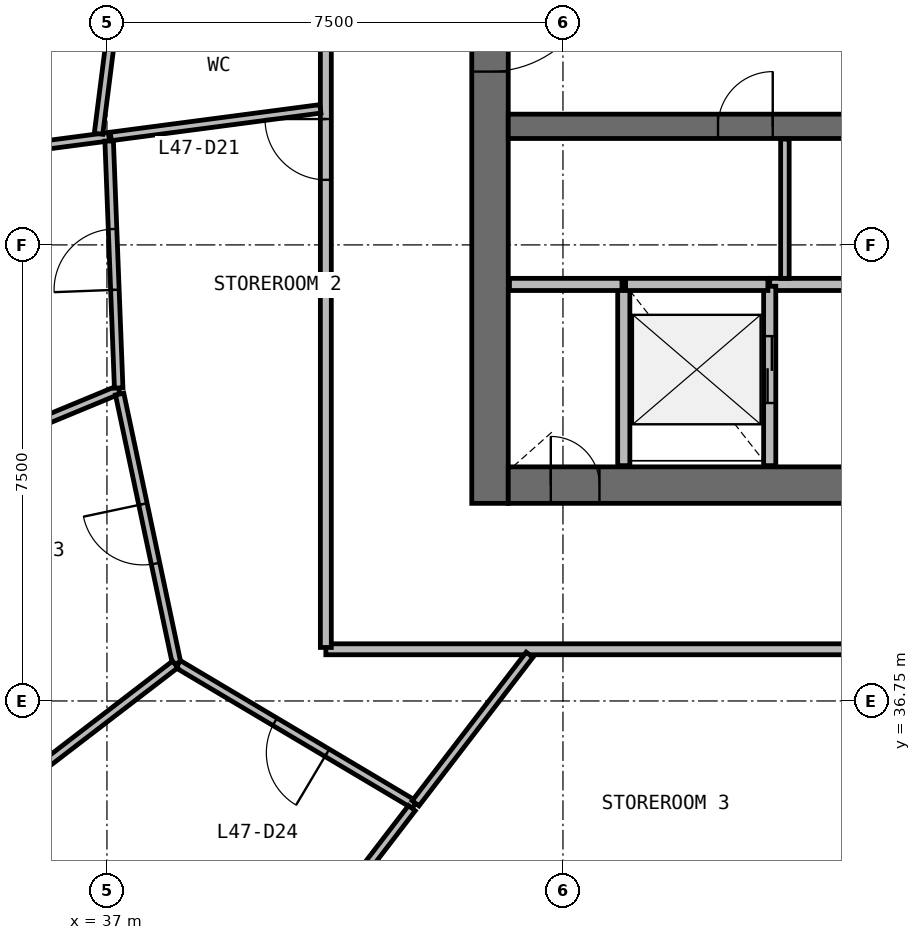
"""IFC4 building model, lengths in metres.
Left out: names, types, materials, properties, quantities, classifications, styles, units other than length and angle.
Written with IfcOpenShell. Run it as: python <this file> out.ifc"""

import sys

from ifc_helpers import new_model, si_unit, direction, frame, frame_2d, origin, place, context, subcontext, project, spatial, rectangle, extrude, source, transform, mapped, element, fill, save


model = new_model("IFC4")
c1 = context("Model", 3, precision=1e-05, world=origin(), true_north=direction((0.0, 1.0)))
c2 = subcontext(c1, "Body", "Model", "MODEL_VIEW")
j1 = project(units=[si_unit("LENGTHUNIT", "METRE"), si_unit("PLANEANGLEUNIT", "RADIAN")], contexts=[c1])
p1 = place(None, origin())
s1 = spatial("IfcSite", under=j1, at=p1, CompositionType="ELEMENT")
p2 = place(p1, origin())
s2 = spatial("IfcBuilding", under=s1, at=p2, CompositionType="ELEMENT")
p3 = place(p2, frame((0.0, 0.0, 195.5)))
s3 = spatial("IfcBuildingStorey", under=s2, at=p3, CompositionType="ELEMENT", Elevation=195.5)
p4 = place(p3, frame((43.3, 56.0, 0.0), z_axis=(0.0, 0.0, 1.0), x_axis=(0.0, -1.0, 0.0)))
e1 = element("IfcWall", 1, at=p4, inside=s3, PredefinedType="SHEAR", context=c2, shape_type="SweptSolid", body=[
    extrude(rectangle(XDim=16.0, YDim=0.6, at=frame_2d((8.0, 0.0))), origin(), (0.0, 0.0, 1.0), 3.9),
])
p5 = place(p4, frame((7.1, 0.0, 0.0)))
e2 = element("IfcOpeningElement", 2, at=p5, cuts=e1, PredefinedType="OPENING", context=c2, shape_type="SweptSolid", body=[
    extrude(rectangle(XDim=1.8, YDim=2.1, at=frame_2d((0.9, 1.05))), frame((0.0, 0.31, 0.0), z_axis=(0.0, -1.0, 0.0), x_axis=(1.0, 0.0, 0.0)), (0.0, 0.0, 1.0), 0.62),
])
p6 = place(p3, frame((43.6, 40.3, 0.0), z_axis=(0.0, 0.0, 1.0), x_axis=(1.0, 0.0, 0.0)))
e3 = element("IfcWall", 3, at=p6, inside=s3, PredefinedType="SHEAR", context=c2, shape_type="SweptSolid", body=[
    extrude(rectangle(XDim=16.8, YDim=0.6, at=frame_2d((8.4, 0.0))), origin(), (0.0, 0.0, 1.0), 3.9),
])
p7 = place(p6, frame((10.3, 0.0, 0.0)))
e4 = element("IfcOpeningElement", 4, at=p7, cuts=e3, PredefinedType="OPENING", context=c2, shape_type="SweptSolid", body=[
    extrude(rectangle(XDim=1.2, YDim=2.1, at=frame_2d((0.6, 1.05))), frame((0.0, 0.31, 0.0), z_axis=(0.0, -1.0, 0.0), x_axis=(1.0, 0.0, 0.0)), (0.0, 0.0, 1.0), 0.62),
])
p8 = place(p6, frame((7.25, 0.0, 0.0)))
e5 = element("IfcOpeningElement", 5, at=p8, cuts=e3, PredefinedType="OPENING", context=c2, shape_type="SweptSolid", body=[
    extrude(rectangle(XDim=1.1, YDim=2.1, at=frame_2d((0.55, 1.05))), frame((0.0, 0.31, 0.0), z_axis=(0.0, -1.0, 0.0), x_axis=(1.0, 0.0, 0.0)), (0.0, 0.0, 1.0), 0.62),
])
p9 = place(p6, frame((0.7, 0.0, 0.0)))
e6 = element("IfcOpeningElement", 6, at=p9, cuts=e3, PredefinedType="OPENING", context=c2, shape_type="SweptSolid", body=[
    extrude(rectangle(XDim=0.8, YDim=2.1, at=frame_2d((0.4, 1.05))), frame((0.0, 0.31, 0.0), z_axis=(0.0, -1.0, 0.0), x_axis=(1.0, 0.0, 0.0)), (0.0, 0.0, 1.0), 0.62),
])
p10 = place(p3, frame((43.6, 46.2, 0.0), z_axis=(0.0, 0.0, 1.0), x_axis=(1.0, 0.0, 0.0)))
e7 = element("IfcWall", 7, at=p10, inside=s3, PredefinedType="SHEAR", context=c2, shape_type="SweptSolid", body=[
    extrude(rectangle(XDim=16.8, YDim=0.4, at=frame_2d((8.4, 0.0))), origin(), (0.0, 0.0, 1.0), 3.9),
])
p11 = place(p10, frame((9.8, 0.0, 0.0)))
e8 = element("IfcOpeningElement", 8, at=p11, cuts=e7, PredefinedType="OPENING", context=c2, shape_type="SweptSolid", body=[
    extrude(rectangle(XDim=1.1, YDim=2.1, at=frame_2d((0.55, 1.05))), frame((0.0, 0.21, 0.0), z_axis=(0.0, -1.0, 0.0), x_axis=(1.0, 0.0, 0.0)), (0.0, 0.0, 1.0), 0.42),
])
p12 = place(p10, frame((12.3, 0.0, 0.0)))
e9 = element("IfcOpeningElement", 9, at=p12, cuts=e7, PredefinedType="OPENING", context=c2, shape_type="SweptSolid", body=[
    extrude(rectangle(XDim=1.1, YDim=2.1, at=frame_2d((0.55, 1.05))), frame((0.0, 0.21, 0.0), z_axis=(0.0, -1.0, 0.0), x_axis=(1.0, 0.0, 0.0)), (0.0, 0.0, 1.0), 0.42),
])
p13 = place(p10, frame((14.8, 0.0, 0.0)))
e10 = element("IfcOpeningElement", 10, at=p13, cuts=e7, PredefinedType="OPENING", context=c2, shape_type="SweptSolid", body=[
    extrude(rectangle(XDim=1.1, YDim=2.1, at=frame_2d((0.55, 1.05))), frame((0.0, 0.21, 0.0), z_axis=(0.0, -1.0, 0.0), x_axis=(1.0, 0.0, 0.0)), (0.0, 0.0, 1.0), 0.42),
])
p14 = place(p10, frame((3.45, 0.0, 0.0)))
e11 = element("IfcOpeningElement", 11, at=p14, cuts=e7, PredefinedType="OPENING", context=c2, shape_type="SweptSolid", body=[
    extrude(rectangle(XDim=0.9, YDim=2.1, at=frame_2d((0.45, 1.05))), frame((0.0, 0.21, 0.0), z_axis=(0.0, -1.0, 0.0), x_axis=(1.0, 0.0, 0.0)), (0.0, 0.0, 1.0), 0.42),
])
p15 = place(p10, frame((7.85, 0.0, 0.0)))
e12 = element("IfcOpeningElement", 12, at=p15, cuts=e7, PredefinedType="OPENING", context=c2, shape_type="SweptSolid", body=[
    extrude(rectangle(XDim=0.9, YDim=2.1, at=frame_2d((0.45, 1.05))), frame((0.0, 0.21, 0.0), z_axis=(0.0, -1.0, 0.0), x_axis=(1.0, 0.0, 0.0)), (0.0, 0.0, 1.0), 0.42),
])
p16 = place(p3, frame((52.7, 43.6, 0.0), z_axis=(0.0, 0.0, 1.0), x_axis=(-1.0, 0.0, 0.0)))
e13 = element("IfcWall", 13, at=p16, inside=s3, PredefinedType="SOLIDWALL", context=c2, shape_type="SweptSolid", body=[
    extrude(rectangle(XDim=4.8, YDim=0.2, at=frame_2d((2.4, 0.0))), origin(), (0.0, 0.0, 1.0), 3.58),
])
p17 = place(p3, frame((45.5, 43.6, 0.0), z_axis=(0.0, 0.0, 1.0), x_axis=(0.0, -1.0, 0.0)))
e14 = element("IfcWall", 14, at=p17, inside=s3, PredefinedType="SOLIDWALL", context=c2, shape_type="SweptSolid", body=[
    extrude(rectangle(XDim=2.98, YDim=0.2, at=frame_2d((1.49, 0.0))), origin(), (0.0, 0.0, 1.0), 3.58),
])
p18 = place(p3, frame((47.9, 40.62, 0.0), z_axis=(0.0, 0.0, 1.0), x_axis=(0.0, 1.0, 0.0)))
e15 = element("IfcWall", 15, at=p18, inside=s3, PredefinedType="SOLIDWALL", context=c2, shape_type="SweptSolid", body=[
    extrude(rectangle(XDim=2.95, YDim=0.2, at=frame_2d((1.475, 0.0))), origin(), (0.0, 0.0, 1.0), 3.58),
])
p19 = place(p18, frame((1.03, 0.0, 0.0)))
e16 = element("IfcOpeningElement", 16, at=p19, cuts=e15, PredefinedType="OPENING", context=c2, shape_type="SweptSolid", body=[
    extrude(rectangle(XDim=1.1, YDim=2.1, at=frame_2d((0.55, 1.05))), frame((0.0, 0.11, 0.0), z_axis=(0.0, -1.0, 0.0), x_axis=(1.0, 0.0, 0.0)), (0.0, 0.0, 1.0), 0.22),
])
p20 = place(p3, frame((47.87, 43.6, 0.0), z_axis=(0.0, 0.0, 1.0), x_axis=(-1.0, 0.0, 0.0)))
e17 = element("IfcWall", 17, at=p20, inside=s3, PredefinedType="SOLIDWALL", context=c2, shape_type="SweptSolid", body=[
    extrude(rectangle(XDim=2.34, YDim=0.2, at=frame_2d((1.17, 0.0))), origin(), (0.0, 0.0, 1.0), 3.58),
])
p21 = place(p3, frame((45.47, 43.6, 0.0), z_axis=(0.0, 0.0, 1.0), x_axis=(-1.0, 0.0, 0.0)))
e18 = element("IfcWall", 18, at=p21, inside=s3, PredefinedType="SOLIDWALL", context=c2, shape_type="SweptSolid", body=[
    extrude(rectangle(XDim=1.85, YDim=0.2, at=frame_2d((0.925, 0.0))), origin(), (0.0, 0.0, 1.0), 3.58),
])
p22 = place(p3, frame((63.4, 37.6, 0.0), z_axis=(0.0, 0.0, 1.0), x_axis=(-1.0, 0.0, 0.0)))
e19 = element("IfcWall", 19, at=p22, inside=s3, PredefinedType="PARTITIONING", context=c2, shape_type="SweptSolid", body=[
    extrude(rectangle(XDim=22.8, YDim=0.18, at=frame_2d((11.4, 0.0))), origin(), (0.0, 0.0, 1.0), 2.88),
])
p23 = place(p22, frame((12.95, 0.0, 0.0)))
e20 = element("IfcOpeningElement", 20, at=p23, cuts=e19, PredefinedType="OPENING", context=c2, shape_type="SweptSolid", body=[
    extrude(rectangle(XDim=1.0, YDim=2.1, at=frame_2d((0.5, 1.05))), frame((0.0, 0.1, 0.0), z_axis=(0.0, -1.0, 0.0), x_axis=(1.0, 0.0, 0.0)), (0.0, 0.0, 1.0), 0.2),
])
p24 = place(p22, frame((10.95, 0.0, 0.0)))
e21 = element("IfcOpeningElement", 21, at=p24, cuts=e19, PredefinedType="OPENING", context=c2, shape_type="SweptSolid", body=[
    extrude(rectangle(XDim=1.0, YDim=2.1, at=frame_2d((0.5, 1.05))), frame((0.0, 0.1, 0.0), z_axis=(0.0, -1.0, 0.0), x_axis=(1.0, 0.0, 0.0)), (0.0, 0.0, 1.0), 0.2),
])
p25 = place(p22, frame((8.75, 0.0, 0.0)))
e22 = element("IfcOpeningElement", 22, at=p25, cuts=e19, PredefinedType="OPENING", context=c2, shape_type="SweptSolid", body=[
    extrude(rectangle(XDim=1.0, YDim=2.1, at=frame_2d((0.5, 1.05))), frame((0.0, 0.1, 0.0), z_axis=(0.0, -1.0, 0.0), x_axis=(1.0, 0.0, 0.0)), (0.0, 0.0, 1.0), 0.2),
])
p26 = place(p3, frame((40.6, 37.63, 0.0), z_axis=(0.0, 0.0, 1.0), x_axis=(0.0, 1.0, 0.0)))
e23 = element("IfcWall", 23, at=p26, inside=s3, PredefinedType="PARTITIONING", context=c2, shape_type="SweptSolid", body=[
    extrude(rectangle(XDim=20.74, YDim=0.18, at=frame_2d((10.37, 0.0))), origin(), (0.0, 0.0, 1.0), 2.88),
])
p27 = place(p26, frame((12.19, 0.0, 0.0)))
e24 = element("IfcOpeningElement", 24, at=p27, cuts=e23, PredefinedType="OPENING", context=c2, shape_type="SweptSolid", body=[
    extrude(rectangle(XDim=0.9, YDim=2.1, at=frame_2d((0.45, 1.05))), frame((0.0, 0.1, 0.0), z_axis=(0.0, -1.0, 0.0), x_axis=(1.0, 0.0, 0.0)), (0.0, 0.0, 1.0), 0.2),
])
p28 = place(p26, frame((9.99, 0.0, 0.0)))
e25 = element("IfcOpeningElement", 25, at=p28, cuts=e23, PredefinedType="OPENING", context=c2, shape_type="SweptSolid", body=[
    extrude(rectangle(XDim=0.9, YDim=2.1, at=frame_2d((0.45, 1.05))), frame((0.0, 0.1, 0.0), z_axis=(0.0, -1.0, 0.0), x_axis=(1.0, 0.0, 0.0)), (0.0, 0.0, 1.0), 0.2),
])
p29 = place(p26, frame((7.69, 0.0, 0.0)))
e26 = element("IfcOpeningElement", 26, at=p29, cuts=e23, PredefinedType="OPENING", context=c2, shape_type="SweptSolid", body=[
    extrude(rectangle(XDim=1.0, YDim=2.1, at=frame_2d((0.5, 1.05))), frame((0.0, 0.1, 0.0), z_axis=(0.0, -1.0, 0.0), x_axis=(1.0, 0.0, 0.0)), (0.0, 0.0, 1.0), 0.2),
])
p30 = place(p26, frame((15.49, 0.0, 0.0)))
e27 = element("IfcOpeningElement", 27, at=p30, cuts=e23, PredefinedType="OPENING", context=c2, shape_type="SweptSolid", body=[
    extrude(rectangle(XDim=1.0, YDim=2.1, at=frame_2d((0.5, 1.05))), frame((0.0, 0.1, 0.0), z_axis=(0.0, -1.0, 0.0), x_axis=(1.0, 0.0, 0.0)), (0.0, 0.0, 1.0), 0.2),
])
p31 = place(p3, frame((37.194, 41.867, 0.0), z_axis=(0.0, 0.0, 1.0), x_axis=(-0.923879050947, -0.382684594961, 0.0)))
e28 = element("IfcWall", 28, at=p31, inside=s3, PredefinedType="PARTITIONING", context=c2, shape_type="SweptSolid", body=[
    extrude(rectangle(XDim=5.982, YDim=0.14, at=frame_2d((2.991, 0.0))), origin(), (0.0, 0.0, 1.0), 2.88),
])
p32 = place(p3, frame((31.388, 45.286, 0.0), z_axis=(0.0, 0.0, 1.0), x_axis=(0.991445974971, 0.130517733331, 0.0)))
e29 = element("IfcWall", 29, at=p32, inside=s3, PredefinedType="PARTITIONING", context=c2, shape_type="SweptSolid", body=[
    extrude(rectangle(XDim=5.694, YDim=0.14, at=frame_2d((2.847, 0.0))), origin(), (0.0, 0.0, 1.0), 2.88),
])
p33 = place(p32, frame((2.25, 0.0, 0.0)))
e30 = element("IfcOpeningElement", 30, at=p33, cuts=e29, PredefinedType="OPENING", context=c2, shape_type="SweptSolid", body=[
    extrude(rectangle(XDim=1.0, YDim=2.1, at=frame_2d((0.5, 1.05))), frame((0.0, 0.08, 0.0), z_axis=(0.0, -1.0, 0.0), x_axis=(1.0, 0.0, 0.0)), (0.0, 0.0, 1.0), 0.16),
])
p34 = place(p3, frame((38.146, 37.369, 0.0), z_axis=(0.0, 0.0, 1.0), x_axis=(-0.207067802177, 0.978326594396, 0.0)))
e31 = element("IfcWall", 31, at=p34, inside=s3, PredefinedType="PARTITIONING", context=c2, shape_type="SweptSolid", body=[
    extrude(rectangle(XDim=4.526, YDim=0.14, at=frame_2d((2.263, 0.0))), origin(), (0.0, 0.0, 1.0), 2.88),
])
p35 = place(p34, frame((1.676, 0.0, 0.0)))
e32 = element("IfcOpeningElement", 32, at=p35, cuts=e31, PredefinedType="OPENING", context=c2, shape_type="SweptSolid", body=[
    extrude(rectangle(XDim=1.0, YDim=2.1, at=frame_2d((0.5, 1.05))), frame((0.0, 0.08, 0.0), z_axis=(0.0, -1.0, 0.0), x_axis=(1.0, 0.0, 0.0)), (0.0, 0.0, 1.0), 0.16),
])
p36 = place(p3, frame((42.058, 35.043, 0.0), z_axis=(0.0, 0.0, 1.0), x_axis=(-0.859530118144, 0.511085096635, 0.0)))
e33 = element("IfcWall", 33, at=p36, inside=s3, PredefinedType="PARTITIONING", context=c2, shape_type="SweptSolid", body=[
    extrude(rectangle(XDim=4.521, YDim=0.14, at=frame_2d((2.261, 0.0))), origin(), (0.0, 0.0, 1.0), 2.88),
])
p37 = place(p36, frame((1.671, 0.0, 0.0)))
e34 = element("IfcOpeningElement", 34, at=p37, cuts=e33, PredefinedType="OPENING", context=c2, shape_type="SweptSolid", body=[
    extrude(rectangle(XDim=1.0, YDim=2.1, at=frame_2d((0.5, 1.05))), frame((0.0, 0.08, 0.0), z_axis=(0.0, -1.0, 0.0), x_axis=(1.0, 0.0, 0.0)), (0.0, 0.0, 1.0), 0.16),
])
p38 = place(p3, frame((38.122, 37.351, 0.0), z_axis=(0.0, 0.0, 1.0), x_axis=(-0.793350839002, -0.608764688738, 0.0)))
e35 = element("IfcWall", 35, at=p38, inside=s3, PredefinedType="PARTITIONING", context=c2, shape_type="SweptSolid", body=[
    extrude(rectangle(XDim=4.492, YDim=0.14, at=frame_2d((2.246, 0.0))), origin(), (0.0, 0.0, 1.0), 2.88),
])
p39 = place(p3, frame((37.193, 41.897, 0.0), z_axis=(0.0, 0.0, 1.0), x_axis=(-0.038555360956, 0.999256465649, 0.0)))
e36 = element("IfcWall", 36, at=p39, inside=s3, PredefinedType="PARTITIONING", context=c2, shape_type="SweptSolid", body=[
    extrude(rectangle(XDim=4.065, YDim=0.14, at=frame_2d((2.033, 0.0))), origin(), (0.0, 0.0, 1.0), 2.88),
])
p40 = place(p39, frame((1.615, 0.0, 0.0)))
e37 = element("IfcOpeningElement", 37, at=p40, cuts=e36, PredefinedType="OPENING", context=c2, shape_type="SweptSolid", body=[
    extrude(rectangle(XDim=1.0, YDim=2.1, at=frame_2d((0.5, 1.05))), frame((0.0, 0.08, 0.0), z_axis=(0.0, -1.0, 0.0), x_axis=(1.0, 0.0, 0.0)), (0.0, 0.0, 1.0), 0.16),
])
p41 = place(p3, frame((37.35, 49.929, 0.0), z_axis=(0.0, 0.0, 1.0), x_axis=(-0.125845801859, -0.992049814351, 0.0)))
e38 = element("IfcWall", 38, at=p41, inside=s3, PredefinedType="PARTITIONING", context=c2, shape_type="SweptSolid", body=[
    extrude(rectangle(XDim=3.882, YDim=0.14, at=frame_2d((1.941, 0.0))), origin(), (0.0, 0.0, 1.0), 2.88),
])
p42 = place(p3, frame((40.51, 46.487, 0.0), z_axis=(0.0, 0.0, 1.0), x_axis=(-0.991441861772, -0.130548974432, 0.0)))
e39 = element("IfcWall", 39, at=p42, inside=s3, PredefinedType="PARTITIONING", context=c2, shape_type="SweptSolid", body=[
    extrude(rectangle(XDim=3.477, YDim=0.14, at=frame_2d((1.738, 0.0))), origin(), (0.0, 0.0, 1.0), 2.88),
])
p43 = place(p3, frame((43.951, 37.51, 0.0), z_axis=(0.0, 0.0, 1.0), x_axis=(-0.608729433535, -0.793377890256, 0.0)))
e40 = element("IfcWall", 40, at=p43, inside=s3, PredefinedType="PARTITIONING", context=c2, shape_type="SweptSolid", body=[
    extrude(rectangle(XDim=3.079, YDim=0.14, at=frame_2d((1.54, 0.0))), origin(), (0.0, 0.0, 1.0), 2.88),
])
p44 = place(p3, frame((48.15, 43.7, 0.0), z_axis=(0.0, 0.0, 1.0), x_axis=(0.0, 1.0, 0.0)))
e41 = element("IfcWall", 41, at=p44, inside=s3, PredefinedType="PARTITIONING", context=c2, shape_type="SweptSolid", body=[
    extrude(rectangle(XDim=2.29, YDim=0.14, at=frame_2d((1.145, 0.0))), origin(), (0.0, 0.0, 1.0), 2.88),
])
p45 = place(p3, frame((42.015, 34.987, 0.0), z_axis=(0.0, 0.0, 1.0), x_axis=(-0.608760473936, -0.793354073144, 0.0)))
e42 = element("IfcWall", 42, at=p45, inside=s3, PredefinedType="PARTITIONING", context=c2, shape_type="SweptSolid", body=[
    extrude(rectangle(XDim=1.838, YDim=0.14, at=frame_2d((0.919, 0.0))), origin(), (0.0, 0.0, 1.0), 2.88),
])
m1 = source(origin(), c2, "Body", "SweptSolid", [
    extrude(rectangle(XDim=1.8, YDim=2.1, at=frame_2d((0.9, 1.05))), frame((0.0, 0.025, 0.0), z_axis=(0.0, -1.0, 0.0), x_axis=(1.0, 0.0, 0.0)), (0.0, 0.0, 1.0), 0.05),
])
p46 = place(p5, origin())
e43 = element("IfcDoor", 43, at=p46, inside=s3, OperationType="SINGLE_SWING_LEFT", PredefinedType="DOOR", context=c2, shape_type="MappedRepresentation", body=[
    mapped(m1, transform((0.0, 0.0, 0.0), scale=1.0)),
])
fill(e2, e43)
m2 = source(origin(), c2, "Body", "SweptSolid", [
    extrude(rectangle(XDim=1.1, YDim=2.1, at=frame_2d((0.55, 1.05))), frame((0.0, 0.025, 0.0), z_axis=(0.0, -1.0, 0.0), x_axis=(1.0, 0.0, 0.0)), (0.0, 0.0, 1.0), 0.05),
])
p47 = place(p19, origin())
e44 = element("IfcDoor", 44, at=p47, inside=s3, OperationType="DOUBLE_DOOR_SLIDING", PredefinedType="USERDEFINED", context=c2, shape_type="MappedRepresentation", body=[
    mapped(m2, transform((0.0, 0.0, 0.0), scale=1.0)),
])
fill(e16, e44)
m3 = source(origin(), c2, "Body", "SweptSolid", [
    extrude(rectangle(XDim=0.8, YDim=2.1, at=frame_2d((0.4, 1.05))), frame((0.0, 0.025, 0.0), z_axis=(0.0, -1.0, 0.0), x_axis=(1.0, 0.0, 0.0)), (0.0, 0.0, 1.0), 0.05),
])
p48 = place(p9, origin())
e45 = element("IfcDoor", 45, at=p48, inside=s3, OperationType="SINGLE_SWING_LEFT", PredefinedType="DOOR", context=c2, shape_type="MappedRepresentation", body=[
    mapped(m3, transform((0.0, 0.0, 0.0), scale=1.0)),
])
fill(e6, e45)
m4 = source(origin(), c2, "Body", "SweptSolid", [
    extrude(rectangle(XDim=1.0, YDim=2.1, at=frame_2d((0.5, 1.05))), frame((0.0, 0.025, 0.0), z_axis=(0.0, -1.0, 0.0), x_axis=(1.0, 0.0, 0.0)), (0.0, 0.0, 1.0), 0.05),
])
p49 = place(p29, origin())
e46 = element("IfcDoor", 46, at=p49, inside=s3, OperationType="SINGLE_SWING_RIGHT", PredefinedType="DOOR", context=c2, shape_type="MappedRepresentation", body=[
    mapped(m4, transform((0.0, 0.0, 0.0), scale=1.0)),
])
fill(e26, e46)
p50 = place(p40, origin())
e47 = element("IfcDoor", 47, at=p50, inside=s3, OperationType="SINGLE_SWING_LEFT", PredefinedType="DOOR", context=c2, shape_type="MappedRepresentation", body=[
    mapped(m4, transform((0.0, 0.0, 0.0), scale=1.0)),
])
fill(e37, e47)
p51 = place(p35, origin())
e48 = element("IfcDoor", 48, at=p51, inside=s3, OperationType="SINGLE_SWING_RIGHT", PredefinedType="DOOR", context=c2, shape_type="MappedRepresentation", body=[
    mapped(m4, transform((0.0, 0.0, 0.0), scale=1.0)),
])
fill(e32, e48)
p52 = place(p37, origin())
e49 = element("IfcDoor", 49, at=p52, inside=s3, OperationType="SINGLE_SWING_LEFT", PredefinedType="DOOR", context=c2, shape_type="MappedRepresentation", body=[
    mapped(m4, transform((0.0, 0.0, 0.0), scale=1.0)),
])
fill(e34, e49)
m5 = source(origin(), c2, "Body", "SweptSolid", [
    extrude(rectangle(XDim=0.9, YDim=2.1, at=frame_2d((0.45, 1.05))), frame((0.0, 0.025, 0.0), z_axis=(0.0, -1.0, 0.0), x_axis=(1.0, 0.0, 0.0)), (0.0, 0.0, 1.0), 0.05),
])
p53 = place(p14, origin())
e50 = element("IfcDoor", 50, at=p53, inside=s3, OperationType="SINGLE_SWING_RIGHT", PredefinedType="DOOR", context=c2, shape_type="MappedRepresentation", body=[
    mapped(m5, transform((0.0, 0.0, 0.0), scale=1.0)),
])
fill(e11, e50)
save(model, sys.argv[1])
